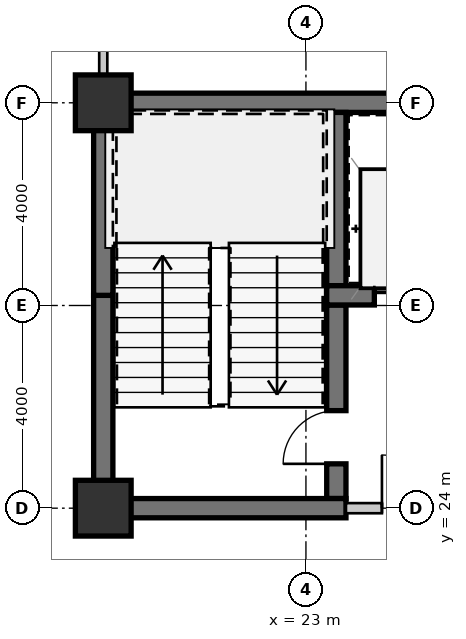
"""IFC4 building model, lengths in metres.
Left out: names, types, materials, properties, quantities, classifications, styles, units other than length and angle.
Written with IfcOpenShell. Run it as: python <this file> out.ifc"""

import sys

from ifc_helpers import new_model, si_unit, direction, frame, frame_2d, origin, origin_2d, place, context, subcontext, project, spatial, rectangle, extrude, source, transform, mapped, element, fill, save


model = new_model("IFC4")
c1 = context("Model", 3, precision=1e-05, world=origin(), true_north=direction((0.0, 1.0)))
c2 = subcontext(c1, "Body", "Model", "MODEL_VIEW")
j1 = project(units=[si_unit("LENGTHUNIT", "METRE"), si_unit("PLANEANGLEUNIT", "RADIAN")], contexts=[c1])
p1 = place(None, origin())
s1 = spatial("IfcSite", under=j1, at=p1, CompositionType="ELEMENT")
p2 = place(p1, origin())
s2 = spatial("IfcBuilding", under=s1, at=p2, CompositionType="ELEMENT")
p3 = place(p2, frame((0.0, 0.0, 4.55)))
s3 = spatial("IfcBuildingStorey", under=s2, at=p3, CompositionType="ELEMENT", Elevation=4.55)
m1 = source(origin(), c2, "Body", "SweptSolid", [
    extrude(rectangle(XDim=1.1, YDim=1.1, at=origin_2d()), origin(), (0.0, 0.0, 1.0), 3.85),
])
for number, where, z_axis, x_axis in (
    (1, (19.0, 24.0, 0.0), (0.0, 0.0, 1.0), (1.0, 0.0, 0.0)),
    (2, (19.0, 32.0, 0.0), (0.0, 0.0, 1.0), (1.0, 0.0, 0.0)),
):
    element("IfcColumn", number, at=place(p3, frame(where, z_axis=z_axis, x_axis=x_axis)), inside=s3, PredefinedType="COLUMN", context=c2, shape_type="MappedRepresentation", body=[
        mapped(m1, transform((0.0, 0.0, 0.0), scale=1.0)),
    ])
m2 = source(origin(), c2, "Body", "SweptSolid", [
    extrude(rectangle(XDim=9.19, YDim=0.38, at=frame_2d((4.595, 0.0))), origin(), (0.0, 0.0, 1.0), 3.59),
])
p4 = place(p3, frame((18.81, 32.0, 0.0), z_axis=(0.0, 0.0, 1.0), x_axis=(1.0, 0.0, 0.0)))
e3 = element("IfcWall", 3, at=p4, inside=s3, PredefinedType="SHEAR", context=c2, shape_type="MappedRepresentation", body=[
    mapped(m2, transform((0.0, 0.0, 0.0), scale=1.0)),
])
m3 = source(origin(), c2, "Body", "SweptSolid", [
    extrude(rectangle(XDim=4.01, YDim=0.38, at=frame_2d((2.005, 0.0))), origin(), (0.0, 0.0, 1.0), 3.59),
])
p5 = place(p3, frame((19.0, 24.19, 0.0), z_axis=(0.0, 0.0, 1.0), x_axis=(0.0, 1.0, 0.0)))
e4 = element("IfcWall", 4, at=p5, inside=s3, PredefinedType="SHEAR", context=c2, shape_type="MappedRepresentation", body=[
    mapped(m3, transform((0.0, 0.0, 0.0), scale=1.0)),
])
m4 = source(origin(), c2, "Body", "SweptSolid", [
    extrude(rectangle(XDim=3.61, YDim=0.38, at=frame_2d((1.805, 0.0))), origin(), (0.0, 0.0, 1.0), 3.59),
])
p6 = place(p3, frame((19.0, 28.2, 0.0), z_axis=(0.0, 0.0, 1.0), x_axis=(0.0, 1.0, 0.0)))
e5 = element("IfcWall", 5, at=p6, inside=s3, PredefinedType="SHEAR", context=c2, shape_type="MappedRepresentation", body=[
    mapped(m4, transform((0.0, 0.0, 0.0), scale=1.0)),
])
m5 = source(origin(), c2, "Body", "SweptSolid", [
    extrude(rectangle(XDim=3.42, YDim=0.38, at=frame_2d((1.71, 0.0))), origin(), (0.0, 0.0, 1.0), 3.59),
])
p7 = place(p3, frame((23.6, 28.39, 0.0), z_axis=(0.0, 0.0, 1.0), x_axis=(0.0, 1.0, 0.0)))
e6 = element("IfcWall", 6, at=p7, inside=s3, PredefinedType="SHEAR", context=c2, shape_type="MappedRepresentation", body=[
    mapped(m5, transform((0.0, 0.0, 0.0), scale=1.0)),
])
m6 = source(origin(), c2, "Body", "SweptSolid", [
    extrude(rectangle(XDim=3.82, YDim=0.38, at=frame_2d((1.91, 0.0))), origin(), (0.0, 0.0, 1.0), 3.59),
])
p8 = place(p3, frame((23.6, 24.19, 0.0), z_axis=(0.0, 0.0, 1.0), x_axis=(0.0, 1.0, 0.0)))
e7 = element("IfcWall", 7, at=p8, inside=s3, PredefinedType="SHEAR", context=c2, shape_type="MappedRepresentation", body=[
    mapped(m6, transform((0.0, 0.0, 0.0), scale=1.0)),
])
m7 = source(origin(), c2, "Body", "SweptSolid", [
    extrude(rectangle(XDim=1.05, YDim=2.1, at=frame_2d((0.525, 1.05))), frame((0.0, 0.2, 0.0), z_axis=(0.0, -1.0, 0.0), x_axis=(1.0, 0.0, 0.0)), (0.0, 0.0, 1.0), 0.4),
])
p9 = place(p8, frame((0.685, 0.0, 0.0)))
e8 = element("IfcOpeningElement", 8, at=p9, cuts=e7, PredefinedType="OPENING", context=c2, shape_type="MappedRepresentation", body=[
    mapped(m7, transform((0.0, 0.0, 0.0), scale=1.0)),
])
m8 = source(origin(), c2, "Body", "SweptSolid", [
    extrude(rectangle(XDim=4.98, YDim=0.38, at=frame_2d((2.49, 0.0))), origin(), (0.0, 0.0, 1.0), 3.59),
])
p10 = place(p3, frame((18.81, 24.0, 0.0), z_axis=(0.0, 0.0, 1.0), x_axis=(1.0, 0.0, 0.0)))
e9 = element("IfcWall", 9, at=p10, inside=s3, PredefinedType="SHEAR", context=c2, shape_type="MappedRepresentation", body=[
    mapped(m8, transform((0.0, 0.0, 0.0), scale=1.0)),
])
m9 = source(origin(), c2, "Body", "SweptSolid", [
    extrude(rectangle(XDim=2.98, YDim=0.38, at=frame_2d((1.49, 0.0))), origin(), (0.0, 0.0, 1.0), 3.59),
])
p11 = place(p3, frame((23.41, 28.2, 0.0), z_axis=(0.0, 0.0, 1.0), x_axis=(1.0, 0.0, 0.0)))
e10 = element("IfcWall", 10, at=p11, inside=s3, PredefinedType="SHEAR", context=c2, shape_type="MappedRepresentation", body=[
    mapped(m9, transform((0.0, 0.0, 0.0), scale=1.0)),
])
m10 = source(origin(), c2, "Body", "SweptSolid", [
    extrude(rectangle(XDim=1.1, YDim=2.15, at=frame_2d((0.55, 1.075))), frame((0.0, 0.2, 0.0), z_axis=(0.0, -1.0, 0.0), x_axis=(1.0, 0.0, 0.0)), (0.0, 0.0, 1.0), 0.4),
])
p12 = place(p11, frame((0.94, 0.0, 0.0)))
e11 = element("IfcOpeningElement", 11, at=p12, cuts=e10, PredefinedType="OPENING", context=c2, shape_type="MappedRepresentation", body=[
    mapped(m10, transform((0.0, 0.0, 0.0), scale=1.0)),
])
m11 = source(origin(), c2, "Body", "SweptSolid", [
    extrude(rectangle(XDim=2.66, YDim=0.2, at=frame_2d((1.33, 0.0))), origin(), (0.0, 0.0, 1.0), 3.13),
])
p13 = place(p3, frame((23.79, 24.0, 0.0), z_axis=(0.0, 0.0, 1.0), x_axis=(1.0, 0.0, 0.0)))
e12 = element("IfcWall", 12, at=p13, inside=s3, PredefinedType="SOLIDWALL", context=c2, shape_type="MappedRepresentation", body=[
    mapped(m11, transform((0.0, 0.0, 0.0), scale=1.0)),
])
m12 = source(origin(), c2, "Body", "SweptSolid", [
    extrude(rectangle(XDim=1.05, YDim=2.1, at=frame_2d((0.525, 1.05))), frame((0.0, 0.11, 0.0), z_axis=(0.0, -1.0, 0.0), x_axis=(1.0, 0.0, 0.0)), (0.0, 0.0, 1.0), 0.22),
])
p14 = place(p13, frame((0.71, 0.0, 0.0)))
e13 = element("IfcOpeningElement", 13, at=p14, cuts=e12, PredefinedType="OPENING", context=c2, shape_type="MappedRepresentation", body=[
    mapped(m12, transform((0.0, 0.0, 0.0), scale=1.0)),
])
m13 = source(origin(), c2, "Body", "SweptSolid", [
    extrude(rectangle(XDim=7.578, YDim=0.16, at=frame_2d((3.789, 0.0))), origin(), (0.0, 0.0, 1.0), 3.59),
])
p15 = place(p3, frame((19.0, 39.768, 0.0), z_axis=(0.0, 0.0, 1.0), x_axis=(0.0, -1.0, 0.0)))
e14 = element("IfcWall", 14, at=p15, inside=s3, PredefinedType="PARTITIONING", context=c2, shape_type="MappedRepresentation", body=[
    mapped(m13, transform((0.0, 0.0, 0.0), scale=1.0)),
])
m14 = source(origin(), c2, "Body", "SweptSolid", [
    extrude(rectangle(XDim=1.05, YDim=2.1, at=frame_2d((0.525, 1.05))), frame((0.0, 0.025, 0.0), z_axis=(0.0, -1.0, 0.0), x_axis=(1.0, 0.0, 0.0)), (0.0, 0.0, 1.0), 0.05),
])
p16 = place(p9, origin())
e15 = element("IfcDoor", 15, at=p16, inside=s3, OperationType="SINGLE_SWING_LEFT", PredefinedType="DOOR", context=c2, shape_type="MappedRepresentation", body=[
    mapped(m14, transform((0.0, 0.0, 0.0), scale=1.0)),
])
fill(e8, e15)
m15 = source(origin(), c2, "Body", "SweptSolid", [
    extrude(rectangle(XDim=1.1, YDim=2.15, at=frame_2d((0.55, 1.075))), frame((0.0, 0.025, 0.0), z_axis=(0.0, -1.0, 0.0), x_axis=(1.0, 0.0, 0.0)), (0.0, 0.0, 1.0), 0.05),
])
p17 = place(p12, origin())
e16 = element("IfcDoor", 16, at=p17, inside=s3, OperationType="SLIDING_TO_LEFT", PredefinedType="DOOR", context=c2, shape_type="MappedRepresentation", body=[
    mapped(m15, transform((0.0, 0.0, 0.0), scale=1.0)),
])
fill(e11, e16)
p18 = place(p14, origin())
e17 = element("IfcDoor", 17, at=p18, inside=s3, OperationType="SINGLE_SWING_LEFT", PredefinedType="DOOR", context=c2, shape_type="MappedRepresentation", body=[
    mapped(m14, transform((0.0, 0.0, 0.0), scale=1.0)),
])
fill(e13, e17)
save(model, sys.argv[1])
